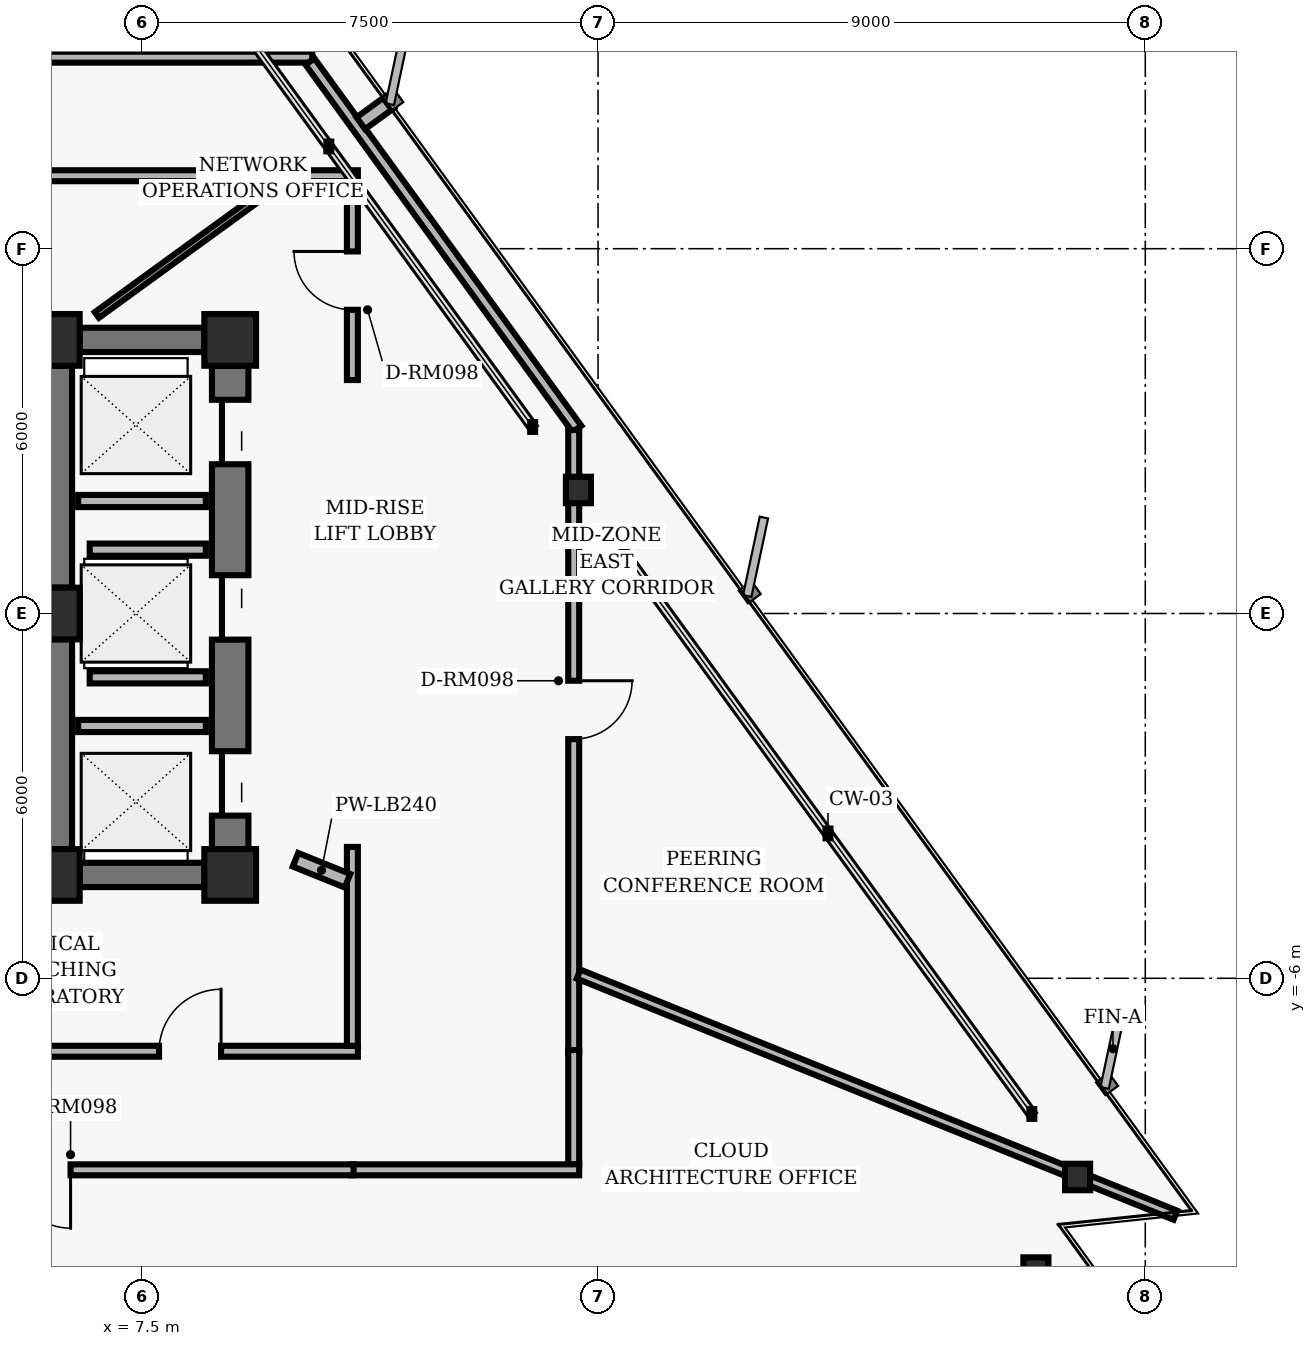
"""IFC4 building model, lengths in metres.
Left out: names, types, materials, properties, quantities, classifications, styles, units other than length and angle.
Written with IfcOpenShell. Run it as: python <this file> out.ifc"""

import sys

from ifc_helpers import new_model, si_unit, direction, frame, frame_2d, origin, origin_2d, place, context, subcontext, project, spatial, rectangle, hollow_rectangle, i_section, extrude, element, fill, save


model = new_model("IFC4")
c1 = context("Model", 3, precision=1e-05, world=origin(), true_north=direction((0.0, 1.0)))
c2 = subcontext(c1, "Body", "Model", "MODEL_VIEW")
j1 = project(units=[si_unit("LENGTHUNIT", "METRE"), si_unit("PLANEANGLEUNIT", "RADIAN")], contexts=[c1])
p1 = place(None, origin())
s1 = spatial("IfcSite", under=j1, at=p1, CompositionType="ELEMENT")
p2 = place(p1, origin())
s2 = spatial("IfcBuilding", under=s1, at=p2, CompositionType="ELEMENT")
p3 = place(p2, frame((0.0, 0.0, 107.68)))
s3 = spatial("IfcBuildingStorey", under=s2, at=p3, CompositionType="ELEMENT", Elevation=107.68)
for number, where, z_axis, x_axis in (
    (1, (6.05, 4.5, 0.0), (0.0, 0.0, 1.0), (1.0, 0.0, 0.0)),
    (2, (6.05, 0.0, 0.0), (0.0, 0.0, 1.0), (1.0, 0.0, 0.0)),
    (3, (6.05, -4.3, 0.0), (0.0, 0.0, 1.0), (1.0, 0.0, 0.0)),
    (4, (8.95, 4.5, 0.0), (0.0, 0.0, 1.0), (1.0, 0.0, 0.0)),
    (5, (8.95, -4.3, 0.0), (0.0, 0.0, 1.0), (1.0, 0.0, 0.0)),
):
    element("IfcColumn", number, at=place(p3, frame(where, z_axis=z_axis, x_axis=x_axis)), inside=s3, PredefinedType="COLUMN", context=c2, shape_type="SweptSolid", body=[
        extrude(hollow_rectangle(XDim=0.85, YDim=0.85, WallThickness=0.055, InnerFilletRadius=0.02, OuterFilletRadius=0.04, at=origin_2d()), origin(), (0.0, 0.0, 1.0), 3.04),
    ])
p4 = place(p3, frame((6.05, 0.425, 0.0), z_axis=(0.0, 0.0, 1.0), x_axis=(0.0, 1.0, 0.0)))
e6 = element("IfcWall", 6, at=p4, inside=s3, PredefinedType="SHEAR", context=c2, shape_type="SweptSolid", body=[
    extrude(rectangle(XDim=3.65, YDim=0.6, at=frame_2d((1.825, 0.0))), origin(), (0.0, 0.0, 1.0), 2.788),
])
p5 = place(p3, frame((6.05, -3.875, 0.0), z_axis=(0.0, 0.0, 1.0), x_axis=(0.0, 1.0, 0.0)))
e7 = element("IfcWall", 7, at=p5, inside=s3, PredefinedType="SHEAR", context=c2, shape_type="SweptSolid", body=[
    extrude(rectangle(XDim=3.45, YDim=0.6, at=frame_2d((1.725, 0.0))), origin(), (0.0, 0.0, 1.0), 2.788),
])
p6 = place(p3, frame((8.95, -3.875, 0.0), z_axis=(0.0, 0.0, 1.0), x_axis=(0.0, 1.0, 0.0)))
e8 = element("IfcWall", 8, at=p6, inside=s3, PredefinedType="SHEAR", context=c2, shape_type="SweptSolid", body=[
    extrude(rectangle(XDim=7.95, YDim=0.6, at=frame_2d((3.975, 0.0))), origin(), (0.0, 0.0, 1.0), 2.788),
])
p7 = place(p6, frame((0.55, 0.0, 0.0)))
e9 = element("IfcOpeningElement", 9, at=p7, cuts=e8, PredefinedType="OPENING", context=c2, shape_type="SweptSolid", body=[
    extrude(rectangle(XDim=1.06, YDim=2.04, at=frame_2d((0.53, 1.02))), frame((0.0, 0.31, 0.0), z_axis=(0.0, -1.0, 0.0), x_axis=(1.0, 0.0, 0.0)), (0.0, 0.0, 1.0), 0.62),
])
p8 = place(p6, frame((3.445, 0.0, 0.0)))
e10 = element("IfcOpeningElement", 10, at=p8, cuts=e8, PredefinedType="OPENING", context=c2, shape_type="SweptSolid", body=[
    extrude(rectangle(XDim=1.06, YDim=2.04, at=frame_2d((0.53, 1.02))), frame((0.0, 0.31, 0.0), z_axis=(0.0, -1.0, 0.0), x_axis=(1.0, 0.0, 0.0)), (0.0, 0.0, 1.0), 0.62),
])
p9 = place(p6, frame((6.33, 0.0, 0.0)))
e11 = element("IfcOpeningElement", 11, at=p9, cuts=e8, PredefinedType="OPENING", context=c2, shape_type="SweptSolid", body=[
    extrude(rectangle(XDim=1.06, YDim=2.04, at=frame_2d((0.53, 1.02))), frame((0.0, 0.31, 0.0), z_axis=(0.0, -1.0, 0.0), x_axis=(1.0, 0.0, 0.0)), (0.0, 0.0, 1.0), 0.62),
])
for number, where, z_axis, x_axis in (
    (12, (6.475, 4.5, 0.0), (0.0, 0.0, 1.0), (1.0, 0.0, 0.0)),
    (13, (6.475, -4.3, 0.0), (0.0, 0.0, 1.0), (1.0, 0.0, 0.0)),
):
    element("IfcWall", number, at=place(p3, frame(where, z_axis=z_axis, x_axis=x_axis)), inside=s3, PredefinedType="SHEAR", context=c2, shape_type="SweptSolid", body=[
        extrude(rectangle(XDim=2.05, YDim=0.4, at=frame_2d((1.025, 0.0))), origin(), (0.0, 0.0, 1.0), 2.788),
    ])
for number, where, z_axis, x_axis in (
    (14, (22.887, -9.268, 0.0), (0.0, 0.0, 1.0), (1.0, 0.0, 0.0)),
    (15, (14.677, 2.032, 0.0), (0.0, 0.0, 1.0), (1.0, 0.0, 0.0)),
    (16, (22.201, -10.807, 0.0), (0.0, 0.0, 1.0), (1.0, 0.0, 0.0)),
):
    element("IfcColumn", number, at=place(p3, frame(where, z_axis=z_axis, x_axis=x_axis)), inside=s3, PredefinedType="COLUMN", context=c2, shape_type="SweptSolid", body=[
        extrude(i_section(OverallWidth=0.412, OverallDepth=0.435, WebThickness=0.036, FlangeThickness=0.057, FilletRadius=0.022, at=origin_2d()), origin(), (0.0, 0.0, 1.0), 3.04),
    ])
for number, where, z_axis, x_axis in (
    (17, (6.45, -1.85, 0.0), (0.0, 0.0, 1.0), (1.0, 0.0, 0.0)),
    (18, (6.45, 1.85, 0.0), (0.0, 0.0, 1.0), (1.0, 0.0, 0.0)),
):
    element("IfcWall", number, at=place(p3, frame(where, z_axis=z_axis, x_axis=x_axis)), inside=s3, PredefinedType="PARTITIONING", context=c2, shape_type="SweptSolid", body=[
        extrude(rectangle(XDim=2.1, YDim=0.2, at=frame_2d((1.05, 0.0))), origin(), (0.0, 0.0, 1.0), 2.763),
    ])
for number, where, z_axis, x_axis in (
    (19, (6.64, -1.05, 0.0), (0.0, 0.0, 1.0), (1.0, 0.0, 0.0)),
    (20, (6.64, 1.05, 0.0), (0.0, 0.0, 1.0), (1.0, 0.0, 0.0)),
):
    element("IfcWall", number, at=place(p3, frame(where, z_axis=z_axis, x_axis=x_axis)), inside=s3, PredefinedType="PARTITIONING", context=c2, shape_type="SweptSolid", body=[
        extrude(rectangle(XDim=1.91, YDim=0.2, at=frame_2d((0.955, 0.0))), origin(), (0.0, 0.0, 1.0), 2.763),
    ])
p10 = place(p3, frame((-6.52, 9.15, 0.0), z_axis=(0.0, 0.0, 1.0), x_axis=(1.0, 0.0, 0.0)))
e21 = element("IfcWall", 21, at=p10, inside=s3, PredefinedType="PARTITIONING", context=c2, shape_type="SweptSolid", body=[
    extrude(rectangle(XDim=16.82, YDim=0.18, at=frame_2d((8.41, 0.0))), origin(), (0.0, 0.0, 1.0), 2.763),
])
p11 = place(p10, frame((10.898, 0.0, 0.0)))
e22 = element("IfcOpeningElement", 22, at=p11, cuts=e21, PredefinedType="OPENING", context=c2, shape_type="SweptSolid", body=[
    extrude(rectangle(XDim=0.96, YDim=2.02, at=frame_2d((0.48, 1.01))), frame((0.0, 0.1, 0.0), z_axis=(0.0, -1.0, 0.0), x_axis=(1.0, 0.0, 0.0)), (0.0, 0.0, 1.0), 0.2),
])
p12 = place(p10, frame((2.749, 0.0, 0.0)))
e23 = element("IfcOpeningElement", 23, at=p12, cuts=e21, PredefinedType="OPENING", context=c2, shape_type="SweptSolid", body=[
    extrude(rectangle(XDim=0.96, YDim=2.02, at=frame_2d((0.48, 1.01))), frame((0.0, 0.1, 0.0), z_axis=(0.0, -1.0, 0.0), x_axis=(1.0, 0.0, 0.0)), (0.0, 0.0, 1.0), 0.2),
])
p13 = place(p3, frame((10.263, 9.077, 0.0), z_axis=(0.0, 0.0, 1.0), x_axis=(0.587780951295, -0.809020119215, 0.0)))
e24 = element("IfcWall", 24, at=p13, inside=s3, PredefinedType="PARTITIONING", context=c2, shape_type="SweptSolid", body=[
    extrude(rectangle(XDim=7.469, YDim=0.18, at=frame_2d((3.734, 0.0))), origin(), (0.0, 0.0, 1.0), 2.763),
])
p14 = place(p3, frame((14.6, 3.018, 0.0), z_axis=(0.0, 0.0, 1.0), x_axis=(0.0, -1.0, 0.0)))
e25 = element("IfcWall", 25, at=p14, inside=s3, PredefinedType="PARTITIONING", context=c2, shape_type="SweptSolid", body=[
    extrude(rectangle(XDim=10.238, YDim=0.18, at=frame_2d((5.119, 0.0))), origin(), (0.0, 0.0, 1.0), 2.763),
])
p15 = place(p14, frame((4.124, 0.0, 0.0)))
e26 = element("IfcOpeningElement", 26, at=p15, cuts=e25, PredefinedType="OPENING", context=c2, shape_type="SweptSolid", body=[
    extrude(rectangle(XDim=0.96, YDim=2.02, at=frame_2d((0.48, 1.01))), frame((0.0, 0.1, 0.0), z_axis=(0.0, -1.0, 0.0), x_axis=(1.0, 0.0, 0.0)), (0.0, 0.0, 1.0), 0.2),
])
p16 = place(p3, frame((14.6, -7.18, 0.0), z_axis=(0.0, 0.0, 1.0), x_axis=(0.0, -1.0, 0.0)))
e27 = element("IfcWall", 27, at=p16, inside=s3, PredefinedType="PARTITIONING", context=c2, shape_type="SweptSolid", body=[
    extrude(rectangle(XDim=1.88, YDim=0.18, at=frame_2d((0.94, 0.0))), origin(), (0.0, 0.0, 1.0), 2.763),
])
p17 = place(p3, frame((14.69, -9.15, 0.0), z_axis=(0.0, 0.0, 1.0), x_axis=(-1.0, 0.0, 0.0)))
e28 = element("IfcWall", 28, at=p17, inside=s3, PredefinedType="PARTITIONING", context=c2, shape_type="SweptSolid", body=[
    extrude(rectangle(XDim=3.75, YDim=0.18, at=frame_2d((1.875, 0.0))), origin(), (0.0, 0.0, 1.0), 2.33),
])
p18 = place(p3, frame((10.98, -9.15, 0.0), z_axis=(0.0, 0.0, 1.0), x_axis=(-1.0, 0.0, 0.0)))
e29 = element("IfcWall", 29, at=p18, inside=s3, PredefinedType="PARTITIONING", context=c2, shape_type="SweptSolid", body=[
    extrude(rectangle(XDim=17.5, YDim=0.18, at=frame_2d((8.75, 0.0))), origin(), (0.0, 0.0, 1.0), 2.33),
])
p19 = place(p18, frame((13.145, 0.0, 0.0)))
e30 = element("IfcOpeningElement", 30, at=p19, cuts=e29, PredefinedType="OPENING", context=c2, shape_type="SweptSolid", body=[
    extrude(rectangle(XDim=0.96, YDim=2.02, at=frame_2d((0.48, 1.01))), frame((0.0, 0.1, 0.0), z_axis=(0.0, -1.0, 0.0), x_axis=(1.0, 0.0, 0.0)), (0.0, 0.0, 1.0), 0.2),
])
p20 = place(p18, frame((4.655, 0.0, 0.0)))
e31 = element("IfcOpeningElement", 31, at=p20, cuts=e29, PredefinedType="OPENING", context=c2, shape_type="SweptSolid", body=[
    extrude(rectangle(XDim=0.96, YDim=2.02, at=frame_2d((0.48, 1.01))), frame((0.0, 0.1, 0.0), z_axis=(0.0, -1.0, 0.0), x_axis=(1.0, 0.0, 0.0)), (0.0, 0.0, 1.0), 0.2),
])
p21 = place(p3, frame((5.53, -7.2, 0.0), z_axis=(0.0, 0.0, 1.0), x_axis=(1.0, 0.0, 0.0)))
e32 = element("IfcWall", 32, at=p21, inside=s3, PredefinedType="PARTITIONING", context=c2, shape_type="SweptSolid", body=[
    extrude(rectangle(XDim=5.52, YDim=0.18, at=frame_2d((2.76, 0.0))), origin(), (0.0, 0.0, 1.0), 2.33),
])
p22 = place(p21, frame((2.25, 0.0, 0.0)))
e33 = element("IfcOpeningElement", 33, at=p22, cuts=e32, PredefinedType="OPENING", context=c2, shape_type="SweptSolid", body=[
    extrude(rectangle(XDim=1.02, YDim=2.02, at=frame_2d((0.51, 1.01))), frame((0.0, 0.1, 0.0), z_axis=(0.0, -1.0, 0.0), x_axis=(1.0, 0.0, 0.0)), (0.0, 0.0, 1.0), 0.2),
])
p23 = place(p3, frame((10.96, -7.11, 0.0), z_axis=(0.0, 0.0, 1.0), x_axis=(0.0, 1.0, 0.0)))
e34 = element("IfcWall", 34, at=p23, inside=s3, PredefinedType="PARTITIONING", context=c2, shape_type="SweptSolid", body=[
    extrude(rectangle(XDim=3.271, YDim=0.18, at=frame_2d((1.635, 0.0))), origin(), (0.0, 0.0, 1.0), 2.763),
])
p24 = place(p3, frame((10.96, 3.84, 0.0), z_axis=(0.0, 0.0, 1.0), x_axis=(0.0, 1.0, 0.0)))
e35 = element("IfcWall", 35, at=p24, inside=s3, PredefinedType="PARTITIONING", context=c2, shape_type="SweptSolid", body=[
    extrude(rectangle(XDim=3.271, YDim=0.18, at=frame_2d((1.635, 0.0))), origin(), (0.0, 0.0, 1.0), 2.763),
])
p25 = place(p24, frame((1.155, 0.0, 0.0)))
e36 = element("IfcOpeningElement", 36, at=p25, cuts=e35, PredefinedType="OPENING", context=c2, shape_type="SweptSolid", body=[
    extrude(rectangle(XDim=0.96, YDim=2.02, at=frame_2d((0.48, 1.01))), frame((0.0, 0.1, 0.0), z_axis=(0.0, -1.0, 0.0), x_axis=(1.0, 0.0, 0.0)), (0.0, 0.0, 1.0), 0.2),
])
p26 = place(p3, frame((11.05, 7.2, 0.0), z_axis=(0.0, 0.0, 1.0), x_axis=(-1.0, 0.0, 0.0)))
e37 = element("IfcWall", 37, at=p26, inside=s3, PredefinedType="PARTITIONING", context=c2, shape_type="SweptSolid", body=[
    extrude(rectangle(XDim=5.12, YDim=0.18, at=frame_2d((2.56, 0.0))), origin(), (0.0, 0.0, 1.0), 2.763),
])
p27 = place(p3, frame((10.024, -4.05, 0.0), z_axis=(0.0, 0.0, 1.0), x_axis=(0.927194137639, -0.374581140912, 0.0)))
e38 = element("IfcWall", 38, at=p27, inside=s3, PredefinedType="PARTITIONING", context=c2, shape_type="SweptSolid", body=[
    extrude(rectangle(XDim=0.923, YDim=0.24, at=frame_2d((0.461, 0.0))), origin(), (0.0, 0.0, 1.0), 2.763),
])
p28 = place(p3, frame((14.68, -5.931, 0.0), z_axis=(0.0, 0.0, 1.0), x_axis=(0.927187622353, -0.374597267682, 0.0)))
e39 = element("IfcWall", 39, at=p28, inside=s3, PredefinedType="PARTITIONING", context=c2, shape_type="SweptSolid", body=[
    extrude(rectangle(XDim=10.586, YDim=0.16, at=frame_2d((5.293, 0.0))), origin(), (0.0, 0.0, 1.0), 2.132),
])
p29 = place(p3, frame((6.758, 4.91, 0.0), z_axis=(0.0, 0.0, 1.0), x_axis=(0.808985911181, 0.58782803226, 0.0)))
e40 = element("IfcWall", 40, at=p29, inside=s3, PredefinedType="MOVABLE", context=c2, shape_type="SweptSolid", body=[
    extrude(rectangle(XDim=3.76, YDim=0.115, at=frame_2d((1.88, 0.0))), origin(), (0.0, 0.0, 1.0), 2.763),
])
p30 = place(p3, frame((11.098, 8.063, 0.0), z_axis=(0.0, 0.0, 1.0), x_axis=(0.809093866449, 0.587679432408, 0.0)))
e41 = element("IfcWall", 41, at=p30, inside=s3, PredefinedType="PARTITIONING", context=c2, shape_type="SweptSolid", body=[
    extrude(rectangle(XDim=0.59, YDim=0.24, at=frame_2d((0.295, 0.0))), origin(), (0.0, 0.0, 1.0), 2.763),
])
p31 = place(p7, origin())
e42 = element("IfcDoor", 42, at=p31, inside=s3, OperationType="SLIDING_TO_LEFT", PredefinedType="DOOR", context=c2, shape_type="SweptSolid", body=[
    extrude(rectangle(XDim=1.06, YDim=2.04, at=frame_2d((0.53, 1.02))), frame((0.0, 0.025, 0.0), z_axis=(0.0, -1.0, 0.0), x_axis=(1.0, 0.0, 0.0)), (0.0, 0.0, 1.0), 0.05),
])
fill(e9, e42)
p32 = place(p8, origin())
e43 = element("IfcDoor", 43, at=p32, inside=s3, OperationType="SLIDING_TO_RIGHT", PredefinedType="DOOR", context=c2, shape_type="SweptSolid", body=[
    extrude(rectangle(XDim=1.06, YDim=2.04, at=frame_2d((0.53, 1.02))), frame((0.0, 0.025, 0.0), z_axis=(0.0, -1.0, 0.0), x_axis=(1.0, 0.0, 0.0)), (0.0, 0.0, 1.0), 0.05),
])
fill(e10, e43)
p33 = place(p9, origin())
e44 = element("IfcDoor", 44, at=p33, inside=s3, OperationType="SLIDING_TO_LEFT", PredefinedType="DOOR", context=c2, shape_type="SweptSolid", body=[
    extrude(rectangle(XDim=1.06, YDim=2.04, at=frame_2d((0.53, 1.02))), frame((0.0, 0.025, 0.0), z_axis=(0.0, -1.0, 0.0), x_axis=(1.0, 0.0, 0.0)), (0.0, 0.0, 1.0), 0.05),
])
fill(e11, e44)
p34 = place(p20, origin())
e45 = element("IfcDoor", 45, at=p34, inside=s3, OperationType="SINGLE_SWING_LEFT", PredefinedType="DOOR", context=c2, shape_type="SweptSolid", body=[
    extrude(rectangle(XDim=0.96, YDim=2.02, at=frame_2d((0.48, 1.01))), frame((0.0, 0.025, 0.0), z_axis=(0.0, -1.0, 0.0), x_axis=(1.0, 0.0, 0.0)), (0.0, 0.0, 1.0), 0.05),
])
fill(e31, e45)
p35 = place(p22, origin())
e46 = element("IfcDoor", 46, at=p35, inside=s3, OperationType="SINGLE_SWING_RIGHT", PredefinedType="DOOR", context=c2, shape_type="SweptSolid", body=[
    extrude(rectangle(XDim=1.02, YDim=2.02, at=frame_2d((0.51, 1.01))), frame((0.0, 0.025, 0.0), z_axis=(0.0, -1.0, 0.0), x_axis=(1.0, 0.0, 0.0)), (0.0, 0.0, 1.0), 0.05),
])
fill(e33, e46)
p36 = place(p15, origin())
e47 = element("IfcDoor", 47, at=p36, inside=s3, OperationType="SINGLE_SWING_LEFT", PredefinedType="DOOR", context=c2, shape_type="SweptSolid", body=[
    extrude(rectangle(XDim=0.96, YDim=2.02, at=frame_2d((0.48, 1.01))), frame((0.0, 0.025, 0.0), z_axis=(0.0, -1.0, 0.0), x_axis=(1.0, 0.0, 0.0)), (0.0, 0.0, 1.0), 0.05),
])
fill(e26, e47)
p37 = place(p25, origin())
e48 = element("IfcDoor", 48, at=p37, inside=s3, OperationType="SINGLE_SWING_RIGHT", PredefinedType="DOOR", context=c2, shape_type="SweptSolid", body=[
    extrude(rectangle(XDim=0.96, YDim=2.02, at=frame_2d((0.48, 1.01))), frame((0.0, 0.025, 0.0), z_axis=(0.0, -1.0, 0.0), x_axis=(1.0, 0.0, 0.0)), (0.0, 0.0, 1.0), 0.05),
])
fill(e36, e48)
save(model, sys.argv[1])
